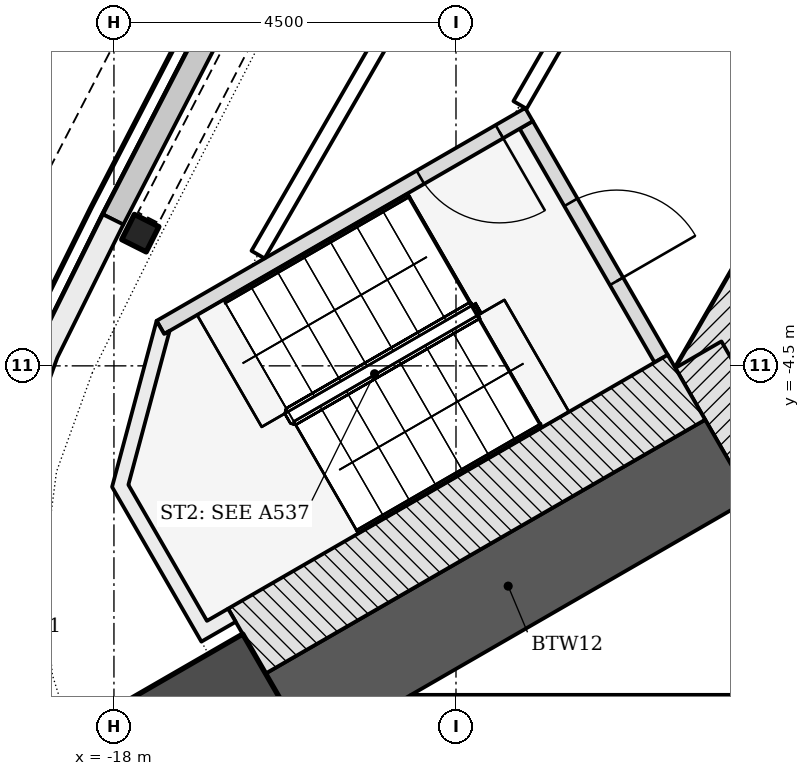
"""IFC4 building model, lengths in metres.
Left out: names, types, materials, properties, quantities, classifications, styles, units other than length and angle.
Written with IfcOpenShell. Run it as: python <this file> out.ifc"""

import sys

from ifc_helpers import new_model, si_unit, direction, frame, frame_2d, origin, origin_2d, place, context, subcontext, project, spatial, polyline, rectangle, i_section, outline, extrude, element, fill, save


model = new_model("IFC4")
c1 = context("Model", 3, precision=1e-05, world=origin(), true_north=direction((0.0, 1.0)))
c2 = subcontext(c1, "Body", "Model", "MODEL_VIEW")
j1 = project(units=[si_unit("LENGTHUNIT", "METRE"), si_unit("PLANEANGLEUNIT", "RADIAN")], contexts=[c1])
p1 = place(None, origin())
s1 = spatial("IfcSite", under=j1, at=p1, CompositionType="ELEMENT")
p2 = place(p1, origin())
s2 = spatial("IfcBuilding", under=s1, at=p2, CompositionType="ELEMENT")
p3 = place(p2, frame((0.0, 0.0, 258.0)))
s3 = spatial("IfcBuildingStorey", under=s2, at=p3, CompositionType="ELEMENT", Elevation=258.0)
p4 = place(p3, frame((-1.083, 11.281, -0.3), z_axis=(0.0, 0.0, 1.0), x_axis=(-0.500001446645, -0.866024568562, 0.0)))
e1 = element("IfcWall", 1, at=p4, inside=s3, PredefinedType="SHEAR", context=c2, shape_type="SweptSolid", body=[
    extrude(rectangle(XDim=18.458, YDim=0.7, at=frame_2d((9.229, 0.0))), origin(), (0.0, 0.0, 1.0), 5.5),
])
p5 = place(p4, frame((8.979, 0.0, 0.3)))
e2 = element("IfcOpeningElement", 2, at=p5, cuts=e1, PredefinedType="OPENING", context=c2, shape_type="SweptSolid", body=[
    extrude(rectangle(XDim=1.2, YDim=2.1, at=frame_2d((0.6, 1.05))), frame((0.0, 0.36, 0.0), z_axis=(0.0, -1.0, 0.0), x_axis=(1.0, 0.0, 0.0)), (0.0, 0.0, 1.0), 0.72),
])
p6 = place(p4, frame((11.029, 0.0, 0.3)))
e3 = element("IfcOpeningElement", 3, at=p6, cuts=e1, PredefinedType="OPENING", context=c2, shape_type="SweptSolid", body=[
    extrude(rectangle(XDim=1.2, YDim=2.1, at=frame_2d((0.6, 1.05))), frame((0.0, 0.36, 0.0), z_axis=(0.0, -1.0, 0.0), x_axis=(1.0, 0.0, 0.0)), (0.0, 0.0, 1.0), 0.72),
])
p7 = place(p3, frame((-10.311, -4.353, -0.3), z_axis=(0.0, 0.0, 1.0), x_axis=(0.500042739161, -0.866000726912, 0.0)))
e4 = element("IfcWall", 4, at=p7, inside=s3, PredefinedType="SHEAR", context=c2, shape_type="SweptSolid", body=[
    extrude(rectangle(XDim=2.771, YDim=0.7, at=frame_2d((1.386, 0.0))), origin(), (0.0, 0.0, 1.0), 5.5),
])
p8 = place(p3, frame((-9.922, -5.728, -0.3), z_axis=(0.0, 0.0, 1.0), x_axis=(-0.866032176823, -0.499988268569, 0.0)))
e5 = element("IfcWall", 5, at=p8, inside=s3, PredefinedType="SHEAR", context=c2, shape_type="SweptSolid", body=[
    extrude(rectangle(XDim=6.678, YDim=1.2, at=frame_2d((3.339, 0.0))), origin(), (0.0, 0.0, 1.0), 5.5),
])
p9 = place(p3, frame((-16.745, -9.667, -0.3), z_axis=(0.0, 0.0, 1.0), x_axis=(-0.866025403784, -0.5, 0.0)))
e6 = element("IfcColumn", 6, at=p9, inside=s3, PredefinedType="COLUMN", context=c2, shape_type="SweptSolid", body=[
    extrude(rectangle(XDim=2.4, YDim=2.4, at=origin_2d()), origin(), (0.0, 0.0, 1.0), 5.5),
])
p10 = place(p3, frame((-17.654, -2.754, -0.3), z_axis=(0.0, 0.0, 1.0), x_axis=(-0.448974965035, -0.893544336209, 0.0)))
e7 = element("IfcColumn", 7, at=p10, inside=s3, PredefinedType="COLUMN", context=c2, shape_type="SweptSolid", body=[
    extrude(i_section(OverallWidth=0.371, OverallDepth=0.361, WebThickness=0.012, FlangeThickness=0.02, FilletRadius=0.015, at=origin_2d()), origin(), (0.0, 0.0, 1.0), 5.5),
])
p11 = place(p3, origin())
e8 = element("IfcWall", 8, at=p11, inside=s3, PredefinedType="NOTDEFINED", context=c2, shape_type="SweptSolid", body=[
    extrude(outline(polyline([(-16.078, 1.49), (-18.145, -2.507), (-17.878, -2.645), (-15.812, 1.352), (-16.078, 1.49)])), origin(), (0.0, 0.0, 1.0), 1.2),
])
p12 = place(p3, origin())
e9 = element("IfcWall", 9, at=p12, inside=s3, PredefinedType="NOTDEFINED", context=c2, shape_type="SweptSolid", body=[
    extrude(outline(polyline([(-18.145, -2.507), (-19.021, -4.273), (-19.538, -5.703), (-19.733, -7.21), (-19.599, -8.724), (-19.141, -10.174), (-18.381, -11.49), (-17.355, -12.611), (-16.111, -13.485), (-14.708, -14.069), (-13.211, -14.336), (-11.244, -14.46), (-11.225, -14.161), (-13.176, -14.038), (-14.623, -13.779), (-15.965, -13.22), (-17.156, -12.385), (-18.138, -11.312), (-18.865, -10.052), (-19.303, -8.665), (-19.432, -7.216), (-19.244, -5.774), (-18.745, -4.391), (-17.876, -2.64), (-18.145, -2.507)])), origin(), (0.0, 0.0, 1.0), 5.2),
])
p13 = place(p3, frame((-12.576, -1.331, -0.3), z_axis=(0.0, 0.0, 1.0), x_axis=(0.499970499736, -0.8660424351, 0.0)))
e10 = element("IfcWall", 10, at=p13, inside=s3, PredefinedType="SHEAR", context=c2, shape_type="SweptSolid", body=[
    extrude(rectangle(XDim=3.55, YDim=0.2, at=frame_2d((1.775, 0.0))), origin(), (0.0, 0.0, 1.0), 5.5),
])
p14 = place(p13, frame((1.175, 0.0, 0.3)))
e11 = element("IfcOpeningElement", 11, at=p14, cuts=e10, PredefinedType="OPENING", context=c2, shape_type="SweptSolid", body=[
    extrude(rectangle(XDim=1.2, YDim=2.1, at=frame_2d((0.6, 1.05))), frame((0.0, 0.11, 0.0), z_axis=(0.0, -1.0, 0.0), x_axis=(1.0, 0.0, 0.0)), (0.0, 0.0, 1.0), 0.22),
])
p15 = place(p3, frame((-12.539, -1.194, -0.3), z_axis=(0.0, 0.0, 1.0), x_axis=(-0.866045472092, -0.499965239061, 0.0)))
e12 = element("IfcWall", 12, at=p15, inside=s3, PredefinedType="SHEAR", context=c2, shape_type="SweptSolid", body=[
    extrude(rectangle(XDim=5.6, YDim=0.2, at=frame_2d((2.8, 0.0))), origin(), (0.0, 0.0, 1.0), 5.5),
])
p16 = place(p15, frame((0.45, 0.0, 0.3)))
e13 = element("IfcOpeningElement", 13, at=p16, cuts=e12, PredefinedType="OPENING", context=c2, shape_type="SweptSolid", body=[
    extrude(rectangle(XDim=1.2, YDim=2.1, at=frame_2d((0.6, 1.05))), frame((0.0, 0.11, 0.0), z_axis=(0.0, -1.0, 0.0), x_axis=(1.0, 0.0, 0.0)), (0.0, 0.0, 1.0), 0.22),
])
p17 = place(p3, frame((-10.468, -4.782, -0.3), z_axis=(0.0, 0.0, 1.0), x_axis=(-0.866016347338, -0.500015685897, 0.0)))
e14 = element("IfcWall", 14, at=p17, inside=s3, PredefinedType="SHEAR", context=c2, shape_type="SweptSolid", body=[
    extrude(rectangle(XDim=6.678, YDim=0.986, at=frame_2d((3.339, 0.0))), origin(), (0.0, 0.0, 1.0), 5.5),
])
p18 = place(p3, frame((0.0, 0.0, -0.3)))
e15 = element("IfcWall", 15, at=p18, inside=s3, PredefinedType="SHEAR", context=c2, shape_type="SweptSolid", body=[
    extrude(outline(polyline([(-17.439, -3.907), (-18.025, -6.093), (-16.85, -8.128), (-16.398, -7.867), (-16.498, -7.694), (-16.498, -7.694), (-16.777, -7.855), (-17.81, -6.065), (-17.267, -4.039), (-17.339, -4.081), (-17.339, -4.081), (-17.339, -4.081), (-17.339, -4.081), (-17.339, -4.081), (-17.339, -4.081), (-17.339, -4.081), (-17.339, -4.081), (-17.339, -4.081), (-17.339, -4.081), (-17.339, -4.081), (-17.339, -4.081), (-17.339, -4.081), (-17.339, -4.081), (-17.339, -4.081), (-17.339, -4.081), (-17.339, -4.081), (-17.439, -3.907)])), origin(), (0.0, 0.0, 1.0), 5.5),
])
p19 = place(p3, frame((-1.287, 18.628, 0.0), z_axis=(0.0, 0.0, 1.0), x_axis=(-0.499998747105, -0.866026127143, 0.0)))
e16 = element("IfcWall", 16, at=p19, inside=s3, PredefinedType="PARTITIONING", context=c2, shape_type="SweptSolid", body=[
    extrude(rectangle(XDim=22.743, YDim=0.2, at=frame_2d((11.371, 0.0))), origin(), (0.0, 0.0, 1.0), 4.652),
])
p20 = place(p19, frame((15.286, 0.0, 0.0)))
e17 = element("IfcOpeningElement", 17, at=p20, cuts=e16, PredefinedType="OPENING", context=c2, shape_type="SweptSolid", body=[
    extrude(rectangle(XDim=1.2, YDim=2.1, at=frame_2d((0.6, 1.05))), frame((0.0, 0.11, 0.0), z_axis=(0.0, -1.0, 0.0), x_axis=(1.0, 0.0, 0.0)), (0.0, 0.0, 1.0), 0.22),
])
p21 = place(p3, frame((-16.104, -3.037, 0.0), z_axis=(0.0, 0.0, 1.0), x_axis=(0.500001441734, 0.866024571397, 0.0)))
e18 = element("IfcWall", 18, at=p21, inside=s3, PredefinedType="PARTITIONING", context=c2, shape_type="SweptSolid", body=[
    extrude(rectangle(XDim=26.765, YDim=0.2, at=frame_2d((13.383, 0.0))), origin(), (0.0, 0.0, 1.0), 4.652),
])
p22 = place(p21, frame((16.004, 0.0, 0.0)))
e19 = element("IfcOpeningElement", 19, at=p22, cuts=e18, PredefinedType="OPENING", context=c2, shape_type="SweptSolid", body=[
    extrude(rectangle(XDim=1.0, YDim=2.1, at=frame_2d((0.5, 1.05))), frame((0.0, 0.11, 0.0), z_axis=(0.0, -1.0, 0.0), x_axis=(1.0, 0.0, 0.0)), (0.0, 0.0, 1.0), 0.22),
])
p23 = place(p3, frame((-14.091, -8.928, 0.0), z_axis=(0.0, 0.0, 1.0), x_axis=(1.0, 0.0, 0.0)))
e20 = element("IfcWall", 20, at=p23, inside=s3, PredefinedType="PARTITIONING", context=c2, shape_type="SweptSolid", body=[
    extrude(rectangle(XDim=18.991, YDim=0.2, at=frame_2d((9.495, 0.0))), origin(), (0.0, 0.0, 1.0), 4.652),
])
p24 = place(p23, frame((5.266, 0.0, 0.0)))
e21 = element("IfcOpeningElement", 21, at=p24, cuts=e20, PredefinedType="OPENING", context=c2, shape_type="SweptSolid", body=[
    extrude(rectangle(XDim=1.0, YDim=2.1, at=frame_2d((0.5, 1.05))), frame((0.0, 0.11, 0.0), z_axis=(0.0, -1.0, 0.0), x_axis=(1.0, 0.0, 0.0)), (0.0, 0.0, 1.0), 0.22),
])
p25 = place(p23, frame((13.693, 0.0, 0.0)))
e22 = element("IfcOpeningElement", 22, at=p25, cuts=e20, PredefinedType="OPENING", context=c2, shape_type="SweptSolid", body=[
    extrude(rectangle(XDim=1.0, YDim=2.1, at=frame_2d((0.5, 1.05))), frame((0.0, 0.11, 0.0), z_axis=(0.0, -1.0, 0.0), x_axis=(1.0, 0.0, 0.0)), (0.0, 0.0, 1.0), 0.22),
])
p26 = place(p23, frame((17.026, 0.0, 0.0)))
e23 = element("IfcOpeningElement", 23, at=p26, cuts=e20, PredefinedType="OPENING", context=c2, shape_type="SweptSolid", body=[
    extrude(rectangle(XDim=1.0, YDim=2.1, at=frame_2d((0.5, 1.05))), frame((0.0, 0.11, 0.0), z_axis=(0.0, -1.0, 0.0), x_axis=(1.0, 0.0, 0.0)), (0.0, 0.0, 1.0), 0.22),
])
p27 = place(p14, origin())
e24 = element("IfcDoor", 24, at=p27, inside=s3, OperationType="SINGLE_SWING_RIGHT", PredefinedType="DOOR", context=c2, shape_type="SweptSolid", body=[
    extrude(rectangle(XDim=1.2, YDim=2.1, at=frame_2d((0.6, 1.05))), frame((0.0, 0.025, 0.0), z_axis=(0.0, -1.0, 0.0), x_axis=(1.0, 0.0, 0.0)), (0.0, 0.0, 1.0), 0.05),
])
fill(e11, e24)
p28 = place(p16, origin())
e25 = element("IfcDoor", 25, at=p28, inside=s3, OperationType="SINGLE_SWING_LEFT", PredefinedType="DOOR", context=c2, shape_type="SweptSolid", body=[
    extrude(rectangle(XDim=1.2, YDim=2.1, at=frame_2d((0.6, 1.05))), frame((0.0, 0.025, 0.0), z_axis=(0.0, -1.0, 0.0), x_axis=(1.0, 0.0, 0.0)), (0.0, 0.0, 1.0), 0.05),
])
fill(e13, e25)
save(model, sys.argv[1])
